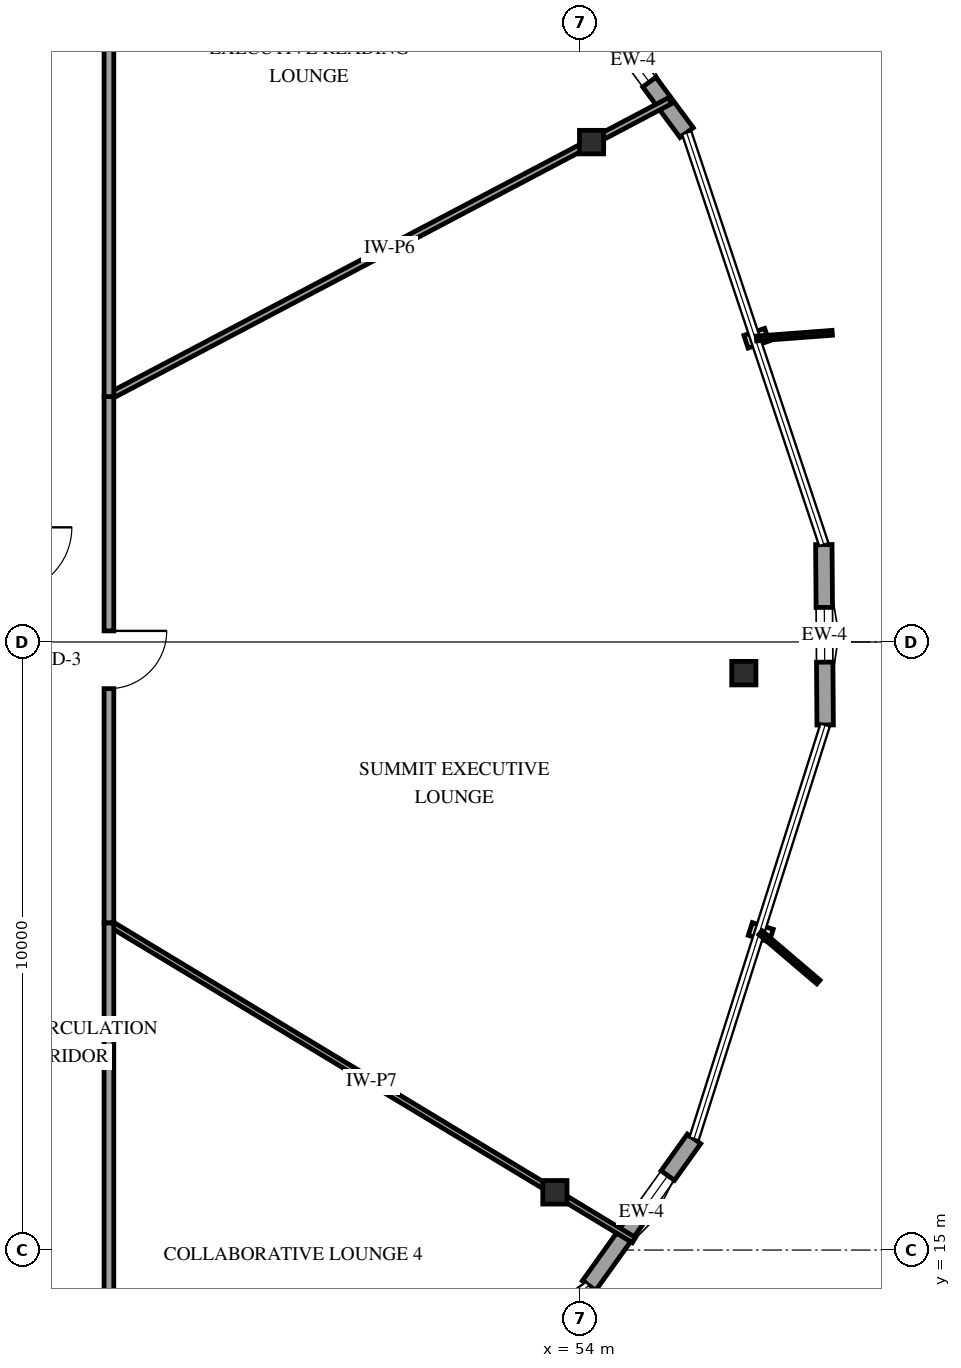
"""IFC4 building model, lengths in metres.
Left out: names, types, materials, properties, quantities, classifications, styles, units other than length and angle.
Written with IfcOpenShell. Run it as: python <this file> out.ifc"""

import sys

from ifc_helpers import new_model, si_unit, direction, frame, frame_2d, origin, origin_2d, place, context, subcontext, project, spatial, rectangle, i_section, extrude, element, fill, save


model = new_model("IFC4")
c1 = context("Model", 3, precision=1e-05, world=origin(), true_north=direction((0.0, 1.0)))
c2 = subcontext(c1, "Body", "Model", "MODEL_VIEW")
j1 = project(units=[si_unit("LENGTHUNIT", "METRE"), si_unit("PLANEANGLEUNIT", "RADIAN")], contexts=[c1])
p1 = place(None, origin())
s1 = spatial("IfcSite", under=j1, at=p1, CompositionType="ELEMENT")
p2 = place(p1, origin())
s2 = spatial("IfcBuilding", under=s1, at=p2, CompositionType="ELEMENT")
p3 = place(p2, frame((0.0, 0.0, 301.45)))
s3 = spatial("IfcBuildingStorey", under=s2, at=p3, CompositionType="ELEMENT", Elevation=301.45)
for number, where, z_axis, x_axis in (
    (1, (54.187, 33.22, 0.0), (0.0, 0.0, 1.0), (1.0, 0.0, 0.0)),
    (2, (53.584, 15.95, 0.0), (0.0, 0.0, 1.0), (1.0, 0.0, 0.0)),
    (3, (56.691, 24.487, 0.0), (0.0, 0.0, 1.0), (1.0, 0.0, 0.0)),
):
    element("IfcColumn", number, at=place(p3, frame(where, z_axis=z_axis, x_axis=x_axis)), inside=s3, PredefinedType="COLUMN", context=c2, shape_type="SweptSolid", body=[
        extrude(i_section(OverallWidth=0.398, OverallDepth=0.387, WebThickness=0.021, FlangeThickness=0.033, FilletRadius=0.038, at=origin_2d()), origin(), (0.0, 0.0, 1.0), 4.2),
    ])
p4 = place(p3, frame((54.146, 14.416, 0.0), z_axis=(0.0, 0.0, 1.0), x_axis=(0.581860834108, 0.813288368127, 0.0)))
e4 = element("IfcWall", 4, at=p4, inside=s3, PredefinedType="SOLIDWALL", context=c2, shape_type="SweptSolid", body=[
    extrude(rectangle(XDim=2.967, YDim=0.27, at=frame_2d((1.483, 0.0))), origin(), (0.0, 0.0, 1.0), 3.274),
])
p5 = place(p4, frame((1.325, 0.0, 0.75)))
e5 = element("IfcOpeningElement", 5, at=p5, cuts=e4, PredefinedType="OPENING", context=c2, shape_type="SweptSolid", body=[
    extrude(rectangle(XDim=0.9, YDim=1.5, at=frame_2d((0.45, 0.75))), frame((0.0, 0.145, 0.0), z_axis=(0.0, -1.0, 0.0), x_axis=(1.0, 0.0, 0.0)), (0.0, 0.0, 1.0), 0.29),
])
p6 = place(p3, frame((58.029, 23.635, 0.0), z_axis=(0.0, 0.0, 1.0), x_axis=(-0.007407204195, 0.999972566287, 0.0)))
e6 = element("IfcWall", 6, at=p6, inside=s3, PredefinedType="SOLIDWALL", context=c2, shape_type="SweptSolid", body=[
    extrude(rectangle(XDim=2.966, YDim=0.27, at=frame_2d((1.483, 0.0))), origin(), (0.0, 0.0, 1.0), 3.274),
])
p7 = place(p6, frame((1.033, 0.0, 0.75)))
e7 = element("IfcOpeningElement", 7, at=p7, cuts=e6, PredefinedType="OPENING", context=c2, shape_type="SweptSolid", body=[
    extrude(rectangle(XDim=0.9, YDim=1.5, at=frame_2d((0.45, 0.75))), frame((0.0, 0.145, 0.0), z_axis=(0.0, -1.0, 0.0), x_axis=(1.0, 0.0, 0.0)), (0.0, 0.0, 1.0), 0.29),
])
p8 = place(p3, frame((55.75, 33.376, 0.0), z_axis=(0.0, 0.0, 1.0), x_axis=(-0.593634095406, 0.804735087325, 0.0)))
e8 = element("IfcWall", 8, at=p8, inside=s3, PredefinedType="SOLIDWALL", context=c2, shape_type="SweptSolid", body=[
    extrude(rectangle(XDim=2.967, YDim=0.27, at=frame_2d((1.483, 0.0))), origin(), (0.0, 0.0, 1.0), 3.274),
])
p9 = place(p8, frame((1.033, 0.0, 0.75)))
e9 = element("IfcOpeningElement", 9, at=p9, cuts=e8, PredefinedType="OPENING", context=c2, shape_type="SweptSolid", body=[
    extrude(rectangle(XDim=0.9, YDim=1.5, at=frame_2d((0.45, 0.75))), frame((0.0, 0.145, 0.0), z_axis=(0.0, -1.0, 0.0), x_axis=(1.0, 0.0, 0.0)), (0.0, 0.0, 1.0), 0.29),
])
p10 = place(p3, frame((55.478, 33.901, 0.0), z_axis=(0.0, 0.0, 1.0), x_axis=(-0.884558040769, -0.466430136795, 0.0)))
e10 = element("IfcWall", 10, at=p10, inside=s3, PredefinedType="PARTITIONING", context=c2, shape_type="SweptSolid", body=[
    extrude(rectangle(XDim=10.432, YDim=0.11, at=frame_2d((5.216, 0.0))), origin(), (0.0, 0.0, 1.0), 3.273),
])
p11 = place(p3, frame((46.25, 20.379, 0.0), z_axis=(0.0, 0.0, 1.0), x_axis=(0.855983606602, -0.517002964429, 0.0)))
e11 = element("IfcWall", 11, at=p11, inside=s3, PredefinedType="PARTITIONING", context=c2, shape_type="SweptSolid", body=[
    extrude(rectangle(XDim=10.087, YDim=0.1, at=frame_2d((5.043, 0.0))), origin(), (0.0, 0.0, 1.0), 3.273),
])
p12 = place(p3, frame((46.25, 29.035, 0.0), z_axis=(0.0, 0.0, 1.0), x_axis=(0.0, -1.0, 0.0)))
e12 = element("IfcWall", 12, at=p12, inside=s3, PredefinedType="PARTITIONING", context=c2, shape_type="SweptSolid", body=[
    extrude(rectangle(XDim=8.656, YDim=0.16, at=frame_2d((4.328, 0.0))), origin(), (0.0, 0.0, 1.0), 3.895),
])
p13 = place(p12, frame((3.853, 0.0, 0.0)))
e13 = element("IfcOpeningElement", 13, at=p13, cuts=e12, PredefinedType="OPENING", context=c2, shape_type="SweptSolid", body=[
    extrude(rectangle(XDim=0.95, YDim=2.15, at=frame_2d((0.475, 1.075))), frame((0.0, 0.09, 0.0), z_axis=(0.0, -1.0, 0.0), x_axis=(1.0, 0.0, 0.0)), (0.0, 0.0, 1.0), 0.18),
])
p14 = place(p3, frame((46.25, 36.63, 0.0), z_axis=(0.0, 0.0, 1.0), x_axis=(0.0, -1.0, 0.0)))
e14 = element("IfcWall", 14, at=p14, inside=s3, PredefinedType="PARTITIONING", context=c2, shape_type="SweptSolid", body=[
    extrude(rectangle(XDim=7.595, YDim=0.16, at=frame_2d((3.797, 0.0))), origin(), (0.0, 0.0, 1.0), 3.895),
])
p15 = place(p3, frame((46.25, 20.379, 0.0), z_axis=(0.0, 0.0, 1.0), x_axis=(0.0, -1.0, 0.0)))
e15 = element("IfcWall", 15, at=p15, inside=s3, PredefinedType="PARTITIONING", context=c2, shape_type="SweptSolid", body=[
    extrude(rectangle(XDim=7.009, YDim=0.16, at=frame_2d((3.504, 0.0))), origin(), (0.0, 0.0, 1.0), 3.895),
])
p16 = place(p5, origin())
e16 = element("IfcWindow", 16, at=p16, inside=s3, PartitioningType="SINGLE_PANEL", PredefinedType="WINDOW", context=c2, shape_type="SweptSolid", body=[
    extrude(rectangle(XDim=0.9, YDim=1.5, at=frame_2d((0.45, 0.75))), frame((0.0, 0.03, 0.0), z_axis=(0.0, -1.0, 0.0), x_axis=(1.0, 0.0, 0.0)), (0.0, 0.0, 1.0), 0.06),
])
fill(e5, e16)
p17 = place(p7, origin())
e17 = element("IfcWindow", 17, at=p17, inside=s3, PartitioningType="SINGLE_PANEL", PredefinedType="WINDOW", context=c2, shape_type="SweptSolid", body=[
    extrude(rectangle(XDim=0.9, YDim=1.5, at=frame_2d((0.45, 0.75))), frame((0.0, 0.03, 0.0), z_axis=(0.0, -1.0, 0.0), x_axis=(1.0, 0.0, 0.0)), (0.0, 0.0, 1.0), 0.06),
])
fill(e7, e17)
p18 = place(p9, origin())
e18 = element("IfcWindow", 18, at=p18, inside=s3, PartitioningType="SINGLE_PANEL", PredefinedType="WINDOW", context=c2, shape_type="SweptSolid", body=[
    extrude(rectangle(XDim=0.9, YDim=1.5, at=frame_2d((0.45, 0.75))), frame((0.0, 0.03, 0.0), z_axis=(0.0, -1.0, 0.0), x_axis=(1.0, 0.0, 0.0)), (0.0, 0.0, 1.0), 0.06),
])
fill(e9, e18)
p19 = place(p13, origin())
e19 = element("IfcDoor", 19, at=p19, inside=s3, OperationType="SINGLE_SWING_LEFT", PredefinedType="DOOR", context=c2, shape_type="SweptSolid", body=[
    extrude(rectangle(XDim=0.95, YDim=2.15, at=frame_2d((0.475, 1.075))), frame((0.0, 0.025, 0.0), z_axis=(0.0, -1.0, 0.0), x_axis=(1.0, 0.0, 0.0)), (0.0, 0.0, 1.0), 0.05),
])
fill(e13, e19)
save(model, sys.argv[1])
